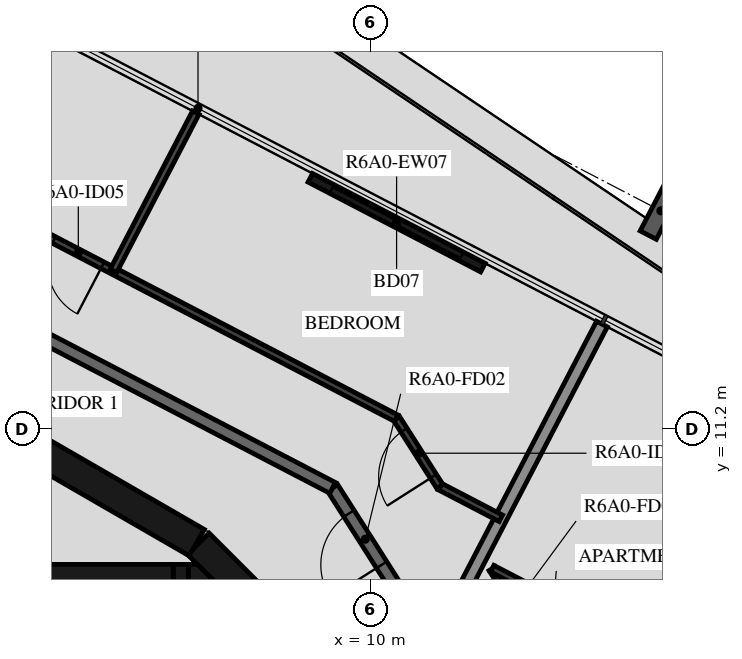
"""IFC4 building model, lengths in metres.
Left out: names, types, materials, properties, quantities, classifications, styles, units other than length and angle.
Written with IfcOpenShell. Run it as: python <this file> out.ifc"""

import sys

from ifc_helpers import new_model, si_unit, direction, frame, frame_2d, origin, origin_2d, place, context, subcontext, project, spatial, polyline, rectangle, i_section, outline, extrude, element, fill, save


model = new_model("IFC4")
c1 = context("Model", 3, precision=1e-05, world=origin(), true_north=direction((0.0, 1.0)))
c2 = subcontext(c1, "Body", "Model", "MODEL_VIEW")
j1 = project(units=[si_unit("LENGTHUNIT", "METRE"), si_unit("PLANEANGLEUNIT", "RADIAN")], contexts=[c1])
p1 = place(None, origin())
s1 = spatial("IfcSite", under=j1, at=p1, CompositionType="ELEMENT")
p2 = place(p1, origin())
s2 = spatial("IfcBuilding", under=s1, at=p2, CompositionType="ELEMENT")
p3 = place(p2, frame((0.0, 0.0, 226.7)))
s3 = spatial("IfcBuildingStorey", under=s2, at=p3, CompositionType="ELEMENT", Elevation=226.7)
p4 = place(p3, frame((14.771, 14.784, -0.45), z_axis=(0.0, 0.0, 1.0), x_axis=(0.887010710334, -0.461748849216, 0.0)))
e1 = element("IfcColumn", 1, at=p4, inside=s3, PredefinedType="COLUMN", context=c2, shape_type="SweptSolid", body=[
    extrude(i_section(OverallWidth=0.3, OverallDepth=0.9, WebThickness=0.019, FlangeThickness=0.035, FilletRadius=0.03, at=origin_2d()), origin(), (0.0, 0.0, 1.0), 3.57),
])
p5 = place(p3, frame((11.844, 13.851, 0.0), z_axis=(0.0, 0.0, 1.0), x_axis=(-0.887014349583, 0.461741858221, 0.0)))
e2 = element("IfcWall", 2, at=p5, inside=s3, PredefinedType="STANDARD", context=c2, shape_type="SweptSolid", body=[
    extrude(rectangle(XDim=3.2, YDim=0.16, at=frame_2d((1.6, 0.0))), origin(), (0.0, 0.0, 1.0), 3.12),
])
p6 = place(p5, frame((0.4, 0.0, 0.0)))
e3 = element("IfcOpeningElement", 3, at=p6, cuts=e2, PredefinedType="OPENING", context=c2, shape_type="SweptSolid", body=[
    extrude(rectangle(XDim=2.4, YDim=2.4, at=frame_2d((1.2, 1.2))), frame((0.0, 0.09, 0.0), z_axis=(0.0, -1.0, 0.0), x_axis=(1.0, 0.0, 0.0)), (0.0, 0.0, 1.0), 0.18),
])
p7 = place(p3, frame((9.308, 7.164, 0.0), z_axis=(0.0, 0.0, 1.0), x_axis=(-0.707106781187, 0.707106781187, 0.0)))
e4 = element("IfcWall", 4, at=p7, inside=s3, PredefinedType="SHEAR", context=c2, shape_type="SweptSolid", body=[
    extrude(rectangle(XDim=3.032, YDim=0.5, at=frame_2d((1.516, 0.0))), origin(), (0.0, 0.0, 1.0), 3.12),
])
p8 = place(p7, frame((0.416, 0.0, 0.0)))
e5 = element("IfcOpeningElement", 5, at=p8, cuts=e4, PredefinedType="OPENING", context=c2, shape_type="SweptSolid", body=[
    extrude(rectangle(XDim=1.2, YDim=2.1, at=frame_2d((0.6, 1.05))), frame((0.0, 0.26, 0.0), z_axis=(0.0, -1.0, 0.0), x_axis=(1.0, 0.0, 0.0)), (0.0, 0.0, 1.0), 0.52),
])
p9 = place(p3, frame((7.137, 9.329, 0.0), z_axis=(0.0, 0.0, 1.0), x_axis=(-0.865975092491, 0.500087131594, 0.0)))
e6 = element("IfcWall", 6, at=p9, inside=s3, PredefinedType="SHEAR", context=c2, shape_type="SweptSolid", body=[
    extrude(rectangle(XDim=3.033, YDim=0.5, at=frame_2d((1.516, 0.0))), origin(), (0.0, 0.0, 1.0), 3.12),
])
p10 = place(p3, frame((0.0, 8.82, 0.0), z_axis=(0.0, 0.0, 1.0), x_axis=(1.0, 0.0, 0.0)))
e7 = element("IfcWall", 7, at=p10, inside=s3, PredefinedType="SHEAR", context=c2, shape_type="SweptSolid", body=[
    extrude(rectangle(XDim=6.75, YDim=0.3, at=frame_2d((3.375, 0.0))), origin(), (0.0, 0.0, 1.0), 3.12),
])
p11 = place(p3, frame((6.875, 5.05, 0.0), z_axis=(0.0, 0.0, 1.0), x_axis=(0.0, 1.0, 0.0)))
e8 = element("IfcWall", 8, at=p11, inside=s3, PredefinedType="SHEAR", context=c2, shape_type="SweptSolid", body=[
    extrude(rectangle(XDim=3.92, YDim=0.25, at=frame_2d((1.96, 0.0))), origin(), (0.0, 0.0, 1.0), 3.12),
])
p12 = place(p11, frame((1.11, 0.0, 0.0)))
e9 = element("IfcOpeningElement", 9, at=p12, cuts=e8, PredefinedType="OPENING", context=c2, shape_type="SweptSolid", body=[
    extrude(rectangle(XDim=1.2, YDim=2.1, at=frame_2d((0.6, 1.05))), frame((0.0, 0.135, 0.0), z_axis=(0.0, -1.0, 0.0), x_axis=(1.0, 0.0, 0.0)), (0.0, 0.0, 1.0), 0.27),
])
p13 = place(p3, origin())
e10 = element("IfcWall", 10, at=p13, inside=s3, PredefinedType="SHEAR", context=c2, shape_type="SweptSolid", body=[
    extrude(outline(polyline([(7.448, 8.67), (7.0, 8.67), (7.0, 8.97), (7.148, 8.97), (7.448, 8.67)])), origin(), (0.0, 0.0, 1.0), 3.12),
])
p14 = place(p3, frame((13.231, 4.172, 0.0), z_axis=(0.0, 0.0, 1.0), x_axis=(-0.537304397561, 0.843388394728, 0.0)))
e11 = element("IfcWall", 11, at=p14, inside=s3, PredefinedType="STANDARD", context=c2, shape_type="SweptSolid", body=[
    extrude(rectangle(XDim=7.181, YDim=0.2, at=frame_2d((3.59, 0.0))), origin(), (0.0, 0.0, 1.0), 3.12),
])
p15 = place(p14, frame((2.881, 0.0, 0.0)))
e12 = element("IfcOpeningElement", 12, at=p15, cuts=e11, PredefinedType="OPENING", context=c2, shape_type="SweptSolid", body=[
    extrude(rectangle(XDim=1.0, YDim=2.1, at=frame_2d((0.5, 1.05))), frame((0.0, 0.11, 0.0), z_axis=(0.0, -1.0, 0.0), x_axis=(1.0, 0.0, 0.0)), (0.0, 0.0, 1.0), 0.22),
])
p16 = place(p14, frame((5.681, 0.0, 0.0)))
e13 = element("IfcOpeningElement", 13, at=p16, cuts=e11, PredefinedType="OPENING", context=c2, shape_type="SweptSolid", body=[
    extrude(rectangle(XDim=1.0, YDim=2.1, at=frame_2d((0.5, 1.05))), frame((0.0, 0.11, 0.0), z_axis=(0.0, -1.0, 0.0), x_axis=(1.0, 0.0, 0.0)), (0.0, 0.0, 1.0), 0.22),
])
p17 = place(p3, frame((9.372, 10.228, 0.0), z_axis=(0.0, 0.0, 1.0), x_axis=(-0.887005184532, 0.461759464021, 0.0)))
e14 = element("IfcWall", 14, at=p17, inside=s3, PredefinedType="STANDARD", context=c2, shape_type="SweptSolid", body=[
    extrude(rectangle(XDim=7.181, YDim=0.2, at=frame_2d((3.591, 0.0))), origin(), (0.0, 0.0, 1.0), 3.12),
])
p18 = place(p3, frame((13.801, 12.922, 0.0), z_axis=(0.0, 0.0, 1.0), x_axis=(-0.461726485624, -0.887022351733, 0.0)))
e15 = element("IfcWall", 15, at=p18, inside=s3, PredefinedType="STANDARD", context=c2, shape_type="SweptSolid", body=[
    extrude(rectangle(XDim=5.984, YDim=0.2, at=frame_2d((2.992, 0.0))), origin(), (0.0, 0.0, 1.0), 2.73),
])
p19 = place(p3, frame((14.615, 4.79, 0.0), z_axis=(0.0, 0.0, 1.0), x_axis=(-0.537312928062, 0.843382960071, 0.0)))
e16 = element("IfcWall", 16, at=p19, inside=s3, PredefinedType="PARTITIONING", context=c2, shape_type="SweptSolid", body=[
    extrude(rectangle(XDim=4.875, YDim=0.12, at=frame_2d((2.437, 0.0))), origin(), (0.0, 0.0, 1.0), 3.12),
])
p20 = place(p3, frame((21.085, 4.169, 0.0), z_axis=(0.0, 0.0, 1.0), x_axis=(-0.887017373034, 0.461736050071, 0.0)))
e17 = element("IfcWall", 17, at=p20, inside=s3, PredefinedType="PARTITIONING", context=c2, shape_type="SweptSolid", body=[
    extrude(rectangle(XDim=10.247, YDim=0.12, at=frame_2d((5.123, 0.0))), origin(), (0.0, 0.0, 1.0), 3.12),
])
p21 = place(p20, frame((3.425, 0.0, 0.0)))
e18 = element("IfcOpeningElement", 18, at=p21, cuts=e17, PredefinedType="OPENING", context=c2, shape_type="SweptSolid", body=[
    extrude(rectangle(XDim=0.9, YDim=2.1, at=frame_2d((0.45, 1.05))), frame((0.0, 0.07, 0.0), z_axis=(0.0, -1.0, 0.0), x_axis=(1.0, 0.0, 0.0)), (0.0, 0.0, 1.0), 0.14),
])
p22 = place(p3, frame((12.139, 9.729, 0.0), z_axis=(0.0, 0.0, 1.0), x_axis=(-0.887046876331, 0.461679368383, 0.0)))
e19 = element("IfcWall", 19, at=p22, inside=s3, PredefinedType="PARTITIONING", context=c2, shape_type="SweptSolid", body=[
    extrude(rectangle(XDim=1.13, YDim=0.12, at=frame_2d((0.565, 0.0))), origin(), (0.0, 0.0, 1.0), 3.12),
])
p23 = place(p3, frame((11.137, 10.25, 0.0), z_axis=(0.0, 0.0, 1.0), x_axis=(-0.537231369635, 0.843434914786, 0.0)))
e20 = element("IfcWall", 20, at=p23, inside=s3, PredefinedType="PARTITIONING", context=c2, shape_type="SweptSolid", body=[
    extrude(rectangle(XDim=1.332, YDim=0.12, at=frame_2d((0.666, 0.0))), origin(), (0.0, 0.0, 1.0), 3.12),
])
p24 = place(p23, frame((0.2, 0.0, 0.0)))
e21 = element("IfcOpeningElement", 21, at=p24, cuts=e20, PredefinedType="OPENING", context=c2, shape_type="SweptSolid", body=[
    extrude(rectangle(XDim=0.9, YDim=2.1, at=frame_2d((0.45, 1.05))), frame((0.0, 0.07, 0.0), z_axis=(0.0, -1.0, 0.0), x_axis=(1.0, 0.0, 0.0)), (0.0, 0.0, 1.0), 0.14),
])
p25 = place(p3, frame((10.421, 11.373, 0.0), z_axis=(0.0, 0.0, 1.0), x_axis=(-0.887012970857, 0.461744506769, 0.0)))
e22 = element("IfcWall", 22, at=p25, inside=s3, PredefinedType="PARTITIONING", context=c2, shape_type="SweptSolid", body=[
    extrude(rectangle(XDim=7.985, YDim=0.12, at=frame_2d((3.992, 0.0))), origin(), (0.0, 0.0, 1.0), 3.12),
])
p26 = place(p25, frame((5.448, 0.0, 0.0)))
e23 = element("IfcOpeningElement", 23, at=p26, cuts=e22, PredefinedType="OPENING", context=c2, shape_type="SweptSolid", body=[
    extrude(rectangle(XDim=0.9, YDim=2.1, at=frame_2d((0.45, 1.05))), frame((0.0, 0.07, 0.0), z_axis=(0.0, -1.0, 0.0), x_axis=(1.0, 0.0, 0.0)), (0.0, 0.0, 1.0), 0.14),
])
p27 = place(p3, frame((7.122, 16.399, 0.0), z_axis=(0.0, 0.0, 1.0), x_axis=(-0.461763975246, -0.887002836053, 0.0)))
e24 = element("IfcWall", 24, at=p27, inside=s3, PredefinedType="PARTITIONING", context=c2, shape_type="SweptSolid", body=[
    extrude(rectangle(XDim=2.934, YDim=0.12, at=frame_2d((1.467, 0.0))), origin(), (0.0, 0.0, 1.0), 2.73),
])
p28 = place(p6, origin())
e25 = element("IfcDoor", 25, at=p28, inside=s3, OperationType="DOUBLE_DOOR_SLIDING", PredefinedType="DOOR", context=c2, shape_type="SweptSolid", body=[
    extrude(rectangle(XDim=2.4, YDim=2.4, at=frame_2d((1.2, 1.2))), frame((0.0, 0.025, 0.0), z_axis=(0.0, -1.0, 0.0), x_axis=(1.0, 0.0, 0.0)), (0.0, 0.0, 1.0), 0.05),
])
fill(e3, e25)
p29 = place(p16, origin())
e26 = element("IfcDoor", 26, at=p29, inside=s3, OperationType="SINGLE_SWING_LEFT", PredefinedType="DOOR", context=c2, shape_type="SweptSolid", body=[
    extrude(rectangle(XDim=1.0, YDim=2.1, at=frame_2d((0.5, 1.05))), frame((0.0, 0.025, 0.0), z_axis=(0.0, -1.0, 0.0), x_axis=(1.0, 0.0, 0.0)), (0.0, 0.0, 1.0), 0.05),
])
fill(e13, e26)
p30 = place(p24, origin())
e27 = element("IfcDoor", 27, at=p30, inside=s3, OperationType="SINGLE_SWING_LEFT", PredefinedType="DOOR", context=c2, shape_type="SweptSolid", body=[
    extrude(rectangle(XDim=0.9, YDim=2.1, at=frame_2d((0.45, 1.05))), frame((0.0, 0.025, 0.0), z_axis=(0.0, -1.0, 0.0), x_axis=(1.0, 0.0, 0.0)), (0.0, 0.0, 1.0), 0.05),
])
fill(e21, e27)
p31 = place(p26, origin())
e28 = element("IfcDoor", 28, at=p31, inside=s3, OperationType="SINGLE_SWING_RIGHT", PredefinedType="DOOR", context=c2, shape_type="SweptSolid", body=[
    extrude(rectangle(XDim=0.9, YDim=2.1, at=frame_2d((0.45, 1.05))), frame((0.0, 0.025, 0.0), z_axis=(0.0, -1.0, 0.0), x_axis=(1.0, 0.0, 0.0)), (0.0, 0.0, 1.0), 0.05),
])
fill(e23, e28)
save(model, sys.argv[1])
